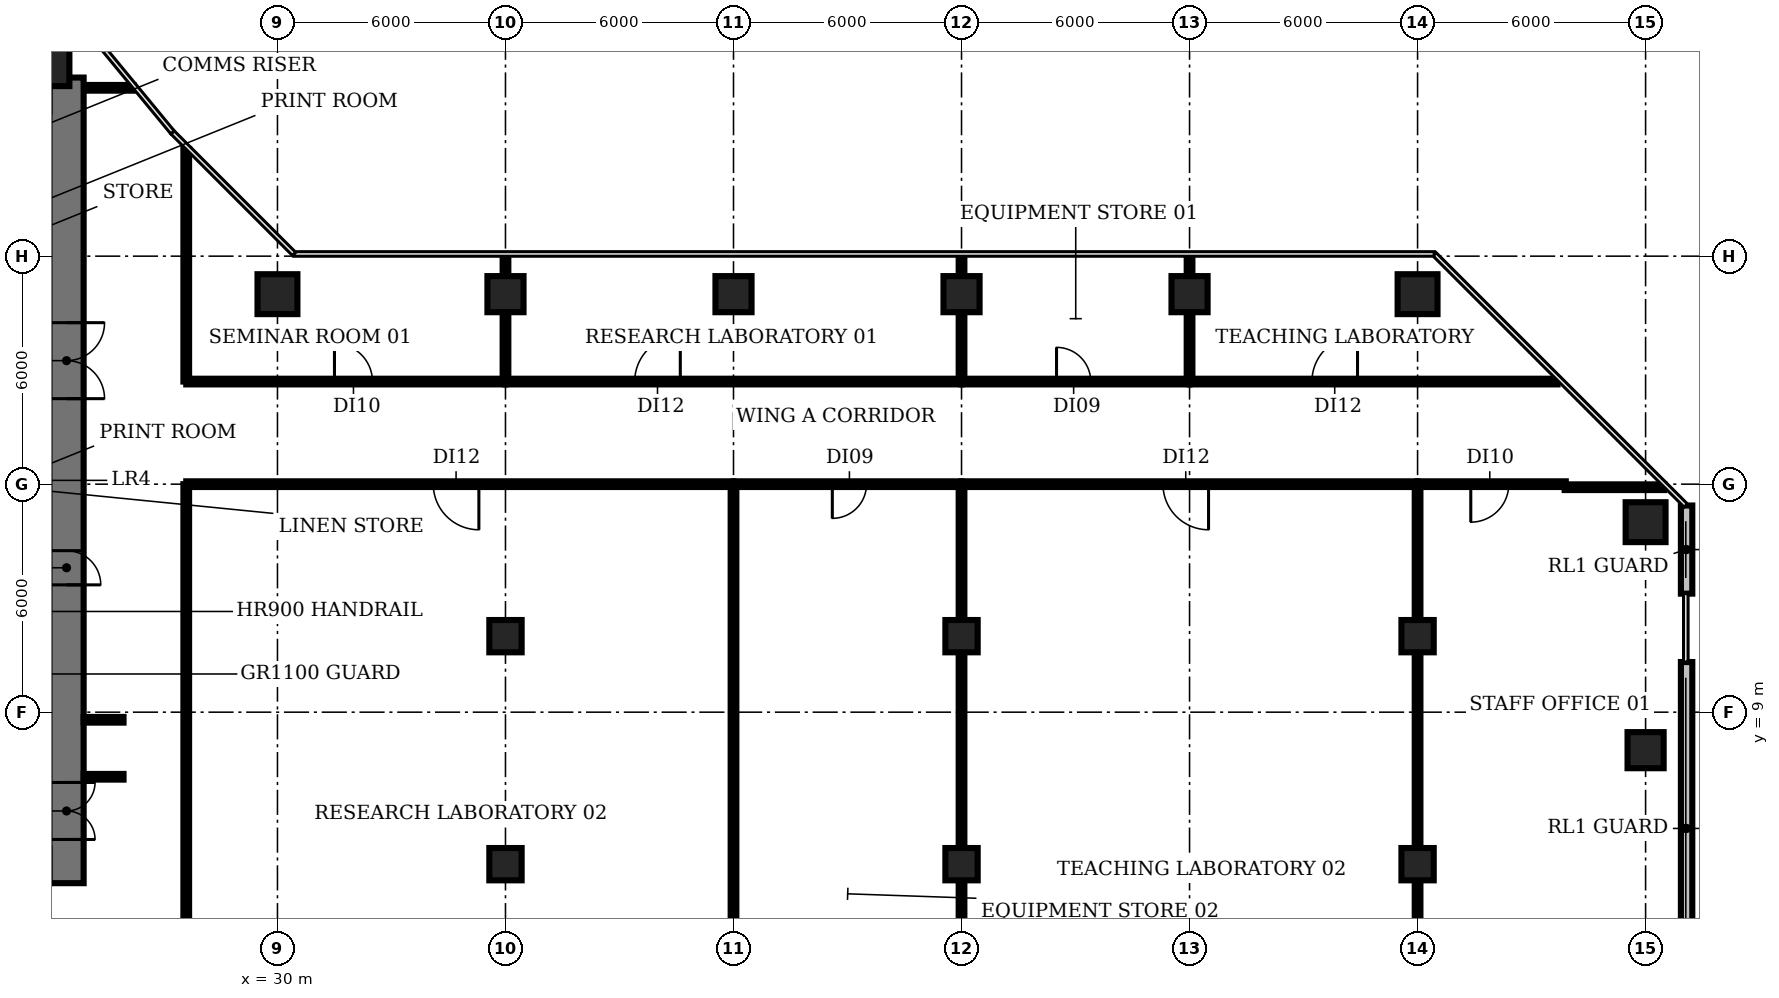
"""IFC4 building model, lengths in metres.
Left out: names, types, materials, properties, quantities, classifications, styles, units other than length and angle.
Written with IfcOpenShell. Run it as: python <this file> out.ifc"""

import sys

from ifc_helpers import new_model, si_unit, direction, frame, frame_2d, origin, origin_2d, place, context, subcontext, project, spatial, rectangle, circle, extrude, element, fill, save


model = new_model("IFC4")
c1 = context("Model", 3, precision=1e-05, world=origin(), true_north=direction((0.0, 1.0)))
c2 = subcontext(c1, "Body", "Model", "MODEL_VIEW")
j1 = project(units=[si_unit("LENGTHUNIT", "METRE"), si_unit("PLANEANGLEUNIT", "RADIAN")], contexts=[c1])
p1 = place(None, origin())
s1 = spatial("IfcSite", under=j1, at=p1, CompositionType="ELEMENT")
p2 = place(p1, origin())
s2 = spatial("IfcBuilding", under=s1, at=p2, CompositionType="ELEMENT")
p3 = place(p2, frame((0.0, 0.0, 29.0)))
s3 = spatial("IfcBuildingStorey", under=s2, at=p3, CompositionType="ELEMENT", Elevation=29.0)
for number, where, z_axis, x_axis in (
    (1, (24.0, 26.0, 0.0), (0.0, 0.0, 1.0), (1.0, 0.0, 0.0)),
    (2, (30.0, 20.0, 0.0), (0.0, 0.0, 1.0), (1.0, 0.0, 0.0)),
):
    element("IfcColumn", number, at=place(p3, frame(where, z_axis=z_axis, x_axis=x_axis)), inside=s3, PredefinedType="COLUMN", context=c2, shape_type="SweptSolid", body=[
        extrude(circle(Radius=0.525, at=origin_2d()), origin(), (0.0, 0.0, 1.0), 3.85),
    ])
for number, where, z_axis, x_axis in (
    (3, (36.0, 5.0, 0.0), (0.0, 0.0, 1.0), (1.0, 0.0, 0.0)),
    (4, (36.0, 11.0, 0.0), (0.0, 0.0, 1.0), (1.0, 0.0, 0.0)),
):
    element("IfcColumn", number, at=place(p3, frame(where, z_axis=z_axis, x_axis=x_axis)), inside=s3, PredefinedType="COLUMN", context=c2, shape_type="SweptSolid", body=[
        extrude(rectangle(XDim=0.85, YDim=0.85, at=origin_2d()), origin(), (0.0, 0.0, 1.0), 3.85),
    ])
for number, where, z_axis, x_axis in (
    (5, (36.0, 20.0, 0.0), (0.0, 0.0, 1.0), (1.0, 0.0, 0.0)),
    (6, (42.0, 20.0, 0.0), (0.0, 0.0, 1.0), (1.0, 0.0, 0.0)),
):
    element("IfcColumn", number, at=place(p3, frame(where, z_axis=z_axis, x_axis=x_axis)), inside=s3, PredefinedType="COLUMN", context=c2, shape_type="SweptSolid", body=[
        extrude(rectangle(XDim=0.95, YDim=0.95, at=origin_2d()), origin(), (0.0, 0.0, 1.0), 3.85),
    ])
for number, where, z_axis, x_axis in (
    (7, (48.0, 5.0, 0.0), (0.0, 0.0, 1.0), (1.0, 0.0, 0.0)),
    (8, (48.0, 11.0, 0.0), (0.0, 0.0, 1.0), (1.0, 0.0, 0.0)),
):
    element("IfcColumn", number, at=place(p3, frame(where, z_axis=z_axis, x_axis=x_axis)), inside=s3, PredefinedType="COLUMN", context=c2, shape_type="SweptSolid", body=[
        extrude(rectangle(XDim=0.85, YDim=0.85, at=origin_2d()), origin(), (0.0, 0.0, 1.0), 3.85),
    ])
for number, where, z_axis, x_axis in (
    (9, (48.0, 20.0, 0.0), (0.0, 0.0, 1.0), (1.0, 0.0, 0.0)),
    (10, (54.0, 20.0, 0.0), (0.0, 0.0, 1.0), (1.0, 0.0, 0.0)),
):
    element("IfcColumn", number, at=place(p3, frame(where, z_axis=z_axis, x_axis=x_axis)), inside=s3, PredefinedType="COLUMN", context=c2, shape_type="SweptSolid", body=[
        extrude(rectangle(XDim=0.95, YDim=0.95, at=origin_2d()), origin(), (0.0, 0.0, 1.0), 3.85),
    ])
for number, where, z_axis, x_axis in (
    (11, (60.0, 5.0, 0.0), (0.0, 0.0, 1.0), (1.0, 0.0, 0.0)),
    (12, (60.0, 11.0, 0.0), (0.0, 0.0, 1.0), (1.0, 0.0, 0.0)),
):
    element("IfcColumn", number, at=place(p3, frame(where, z_axis=z_axis, x_axis=x_axis)), inside=s3, PredefinedType="COLUMN", context=c2, shape_type="SweptSolid", body=[
        extrude(rectangle(XDim=0.85, YDim=0.85, at=origin_2d()), origin(), (0.0, 0.0, 1.0), 3.85),
    ])
p4 = place(p3, frame((60.0, 20.0, 0.0), z_axis=(0.0, 0.0, 1.0), x_axis=(1.0, 0.0, 0.0)))
e13 = element("IfcColumn", 13, at=p4, inside=s3, PredefinedType="COLUMN", context=c2, shape_type="SweptSolid", body=[
    extrude(circle(Radius=0.525, at=origin_2d()), origin(), (0.0, 0.0, 1.0), 3.85),
])
p5 = place(p3, frame((66.0, 8.0, 0.0), z_axis=(0.0, 0.0, 1.0), x_axis=(1.0, 0.0, 0.0)))
e14 = element("IfcColumn", 14, at=p5, inside=s3, PredefinedType="COLUMN", context=c2, shape_type="SweptSolid", body=[
    extrude(rectangle(XDim=0.95, YDim=0.95, at=origin_2d()), origin(), (0.0, 0.0, 1.0), 3.85),
])
p6 = place(p3, frame((66.0, 14.0, 0.0), z_axis=(0.0, 0.0, 1.0), x_axis=(1.0, 0.0, 0.0)))
e15 = element("IfcColumn", 15, at=p6, inside=s3, PredefinedType="COLUMN", context=c2, shape_type="SweptSolid", body=[
    extrude(circle(Radius=0.525, at=origin_2d()), origin(), (0.0, 0.0, 1.0), 3.85),
])
p7 = place(p3, frame((67.079, 1.562, 0.0), z_axis=(0.0, 0.0, 1.0), x_axis=(0.0, 1.0, 0.0)))
e16 = element("IfcWall", 16, at=p7, inside=s3, PredefinedType="SOLIDWALL", context=c2, shape_type="SweptSolid", body=[
    extrude(rectangle(XDim=8.757, YDim=0.3, at=frame_2d((4.379, 0.0))), origin(), (0.0, 0.0, 1.0), 3.85),
])
p8 = place(p3, frame((67.079, 12.119, 0.0), z_axis=(0.0, 0.0, 1.0), x_axis=(0.0, 1.0, 0.0)))
e17 = element("IfcWall", 17, at=p8, inside=s3, PredefinedType="SOLIDWALL", context=c2, shape_type="SweptSolid", body=[
    extrude(rectangle(XDim=2.319, YDim=0.3, at=frame_2d((1.16, 0.0))), origin(), (0.0, 0.0, 1.0), 3.85),
])
p9 = place(p3, frame((24.45, 25.7, 0.0), z_axis=(0.0, 0.0, 1.0), x_axis=(0.0, -1.0, 0.0)))
e18 = element("IfcWall", 18, at=p9, inside=s3, PredefinedType="SHEAR", context=c2, shape_type="SweptSolid", body=[
    extrude(rectangle(XDim=21.2, YDim=0.9, at=frame_2d((10.6, 0.0))), origin(), (0.0, 0.0, 1.0), 3.85),
])
p10 = place(p9, frame((18.55, 0.0, 0.0)))
e19 = element("IfcOpeningElement", 19, at=p10, cuts=e18, PredefinedType="OPENING", context=c2, shape_type="SweptSolid", body=[
    extrude(rectangle(XDim=1.5, YDim=2.1, at=frame_2d((0.75, 1.05))), frame((0.0, 0.46, 0.0), z_axis=(0.0, -1.0, 0.0), x_axis=(1.0, 0.0, 0.0)), (0.0, 0.0, 1.0), 0.92),
])
p11 = place(p9, frame((12.45, 0.0, 0.0)))
e20 = element("IfcOpeningElement", 20, at=p11, cuts=e18, PredefinedType="OPENING", context=c2, shape_type="SweptSolid", body=[
    extrude(rectangle(XDim=0.9, YDim=2.1, at=frame_2d((0.45, 1.05))), frame((0.0, 0.46, 0.0), z_axis=(0.0, -1.0, 0.0), x_axis=(1.0, 0.0, 0.0)), (0.0, 0.0, 1.0), 0.92),
])
p12 = place(p9, frame((6.45, 0.0, 0.0)))
e21 = element("IfcOpeningElement", 21, at=p12, cuts=e18, PredefinedType="OPENING", context=c2, shape_type="SweptSolid", body=[
    extrude(rectangle(XDim=2.0, YDim=2.1, at=frame_2d((1.0, 1.05))), frame((0.0, 0.46, 0.0), z_axis=(0.0, -1.0, 0.0), x_axis=(1.0, 0.0, 0.0)), (0.0, 0.0, 1.0), 0.92),
])
for number, where, z_axis, x_axis in (
    (22, (24.9, 7.3, 0.0), (0.0, 0.0, 1.0), (1.0, 0.0, 0.0)),
    (23, (24.9, 8.8, 0.0), (0.0, 0.0, 1.0), (1.0, 0.0, 0.0)),
):
    element("IfcWall", number, at=place(p3, frame(where, z_axis=z_axis, x_axis=x_axis)), inside=s3, PredefinedType="PARTITIONING", context=c2, shape_type="SweptSolid", body=[
        extrude(rectangle(XDim=1.05, YDim=0.15, at=frame_2d((0.525, 0.0))), origin(), (0.0, 0.0, 1.0), 2.83),
    ])
p13 = place(p3, frame((25.0, 25.43, 0.0), z_axis=(0.0, 0.0, 1.0), x_axis=(1.0, 0.0, 0.0)))
e24 = element("IfcWall", 24, at=p13, inside=s3, PredefinedType="PARTITIONING", context=c2, shape_type="SweptSolid", body=[
    extrude(rectangle(XDim=1.21, YDim=0.15, at=frame_2d((0.605, 0.0))), origin(), (0.0, 0.0, 1.0), 2.83),
])
p14 = place(p3, frame((27.6, 0.6, 0.0), z_axis=(0.0, 0.0, 1.0), x_axis=(0.0, 1.0, 0.0)))
e25 = element("IfcWall", 25, at=p14, inside=s3, PredefinedType="PARTITIONING", context=c2, shape_type="SweptSolid", body=[
    extrude(rectangle(XDim=14.4, YDim=0.15, at=frame_2d((7.2, 0.0))), origin(), (0.0, 0.0, 1.0), 2.83),
])
p15 = place(p3, frame((27.6, 17.7, 0.0), z_axis=(0.0, 0.0, 1.0), x_axis=(0.0, 1.0, 0.0)))
e26 = element("IfcWall", 26, at=p15, inside=s3, PredefinedType="PARTITIONING", context=c2, shape_type="SweptSolid", body=[
    extrude(rectangle(XDim=6.12, YDim=0.15, at=frame_2d((3.06, 0.0))), origin(), (0.0, 0.0, 1.0), 2.83),
])
p16 = place(p3, frame((27.6, 17.7, 0.0), z_axis=(0.0, 0.0, 1.0), x_axis=(1.0, 0.0, 0.0)))
e27 = element("IfcWall", 27, at=p16, inside=s3, PredefinedType="PARTITIONING", context=c2, shape_type="SweptSolid", body=[
    extrude(rectangle(XDim=8.4, YDim=0.15, at=frame_2d((4.2, 0.0))), origin(), (0.0, 0.0, 1.0), 2.83),
])
p17 = place(p16, frame((3.9, 0.0, 0.0)))
e28 = element("IfcOpeningElement", 28, at=p17, cuts=e27, PredefinedType="OPENING", context=c2, shape_type="SweptSolid", body=[
    extrude(rectangle(XDim=1.0, YDim=2.1, at=frame_2d((0.5, 1.05))), frame((0.0, 0.085, 0.0), z_axis=(0.0, -1.0, 0.0), x_axis=(1.0, 0.0, 0.0)), (0.0, 0.0, 1.0), 0.17),
])
p18 = place(p3, frame((36.0, 17.7, 0.0), z_axis=(0.0, 0.0, 1.0), x_axis=(0.0, 1.0, 0.0)))
e29 = element("IfcWall", 29, at=p18, inside=s3, PredefinedType="PARTITIONING", context=c2, shape_type="SweptSolid", body=[
    extrude(rectangle(XDim=3.31, YDim=0.15, at=frame_2d((1.655, 0.0))), origin(), (0.0, 0.0, 1.0), 2.83),
])
p19 = place(p3, frame((36.0, 17.7, 0.0), z_axis=(0.0, 0.0, 1.0), x_axis=(1.0, 0.0, 0.0)))
e30 = element("IfcWall", 30, at=p19, inside=s3, PredefinedType="PARTITIONING", context=c2, shape_type="SweptSolid", body=[
    extrude(rectangle(XDim=12.0, YDim=0.15, at=frame_2d((6.0, 0.0))), origin(), (0.0, 0.0, 1.0), 2.83),
])
p20 = place(p19, frame((3.4, 0.0, 0.0)))
e31 = element("IfcOpeningElement", 31, at=p20, cuts=e30, PredefinedType="OPENING", context=c2, shape_type="SweptSolid", body=[
    extrude(rectangle(XDim=1.2, YDim=2.1, at=frame_2d((0.6, 1.05))), frame((0.0, 0.085, 0.0), z_axis=(0.0, -1.0, 0.0), x_axis=(1.0, 0.0, 0.0)), (0.0, 0.0, 1.0), 0.17),
])
p21 = place(p3, frame((42.0, -6.56, 0.0), z_axis=(0.0, 0.0, 1.0), x_axis=(0.0, 1.0, 0.0)))
e32 = element("IfcWall", 32, at=p21, inside=s3, PredefinedType="PARTITIONING", context=c2, shape_type="SweptSolid", body=[
    extrude(rectangle(XDim=21.56, YDim=0.15, at=frame_2d((10.78, 0.0))), origin(), (0.0, 0.0, 1.0), 2.83),
])
p22 = place(p3, frame((42.0, 15.0, 0.0), z_axis=(0.0, 0.0, 1.0), x_axis=(-1.0, 0.0, 0.0)))
e33 = element("IfcWall", 33, at=p22, inside=s3, PredefinedType="PARTITIONING", context=c2, shape_type="SweptSolid", body=[
    extrude(rectangle(XDim=14.4, YDim=0.15, at=frame_2d((7.2, 0.0))), origin(), (0.0, 0.0, 1.0), 2.83),
])
p23 = place(p22, frame((6.7, 0.0, 0.0)))
e34 = element("IfcOpeningElement", 34, at=p23, cuts=e33, PredefinedType="OPENING", context=c2, shape_type="SweptSolid", body=[
    extrude(rectangle(XDim=1.2, YDim=2.1, at=frame_2d((0.6, 1.05))), frame((0.0, 0.085, 0.0), z_axis=(0.0, -1.0, 0.0), x_axis=(1.0, 0.0, 0.0)), (0.0, 0.0, 1.0), 0.17),
])
p24 = place(p3, frame((48.0, -7.14, 0.0), z_axis=(0.0, 0.0, 1.0), x_axis=(0.0, 1.0, 0.0)))
e35 = element("IfcWall", 35, at=p24, inside=s3, PredefinedType="PARTITIONING", context=c2, shape_type="SweptSolid", body=[
    extrude(rectangle(XDim=22.14, YDim=0.15, at=frame_2d((11.07, 0.0))), origin(), (0.0, 0.0, 1.0), 2.83),
])
p25 = place(p3, frame((48.0, 15.0, 0.0), z_axis=(0.0, 0.0, 1.0), x_axis=(-1.0, 0.0, 0.0)))
e36 = element("IfcWall", 36, at=p25, inside=s3, PredefinedType="PARTITIONING", context=c2, shape_type="SweptSolid", body=[
    extrude(rectangle(XDim=6.0, YDim=0.15, at=frame_2d((3.0, 0.0))), origin(), (0.0, 0.0, 1.0), 2.83),
])
p26 = place(p25, frame((2.5, 0.0, 0.0)))
e37 = element("IfcOpeningElement", 37, at=p26, cuts=e36, PredefinedType="OPENING", context=c2, shape_type="SweptSolid", body=[
    extrude(rectangle(XDim=0.9, YDim=2.1, at=frame_2d((0.45, 1.05))), frame((0.0, 0.085, 0.0), z_axis=(0.0, -1.0, 0.0), x_axis=(1.0, 0.0, 0.0)), (0.0, 0.0, 1.0), 0.17),
])
p27 = place(p3, frame((48.0, 17.7, 0.0), z_axis=(0.0, 0.0, 1.0), x_axis=(0.0, 1.0, 0.0)))
e38 = element("IfcWall", 38, at=p27, inside=s3, PredefinedType="PARTITIONING", context=c2, shape_type="SweptSolid", body=[
    extrude(rectangle(XDim=3.31, YDim=0.15, at=frame_2d((1.655, 0.0))), origin(), (0.0, 0.0, 1.0), 2.83),
])
p28 = place(p3, frame((48.0, 17.7, 0.0), z_axis=(0.0, 0.0, 1.0), x_axis=(1.0, 0.0, 0.0)))
e39 = element("IfcWall", 39, at=p28, inside=s3, PredefinedType="PARTITIONING", context=c2, shape_type="SweptSolid", body=[
    extrude(rectangle(XDim=6.0, YDim=0.15, at=frame_2d((3.0, 0.0))), origin(), (0.0, 0.0, 1.0), 2.83),
])
p29 = place(p28, frame((2.5, 0.0, 0.0)))
e40 = element("IfcOpeningElement", 40, at=p29, cuts=e39, PredefinedType="OPENING", context=c2, shape_type="SweptSolid", body=[
    extrude(rectangle(XDim=0.9, YDim=2.1, at=frame_2d((0.45, 1.05))), frame((0.0, 0.085, 0.0), z_axis=(0.0, -1.0, 0.0), x_axis=(1.0, 0.0, 0.0)), (0.0, 0.0, 1.0), 0.17),
])
p30 = place(p3, frame((54.0, 17.7, 0.0), z_axis=(0.0, 0.0, 1.0), x_axis=(0.0, 1.0, 0.0)))
e41 = element("IfcWall", 41, at=p30, inside=s3, PredefinedType="PARTITIONING", context=c2, shape_type="SweptSolid", body=[
    extrude(rectangle(XDim=3.31, YDim=0.15, at=frame_2d((1.655, 0.0))), origin(), (0.0, 0.0, 1.0), 2.83),
])
p31 = place(p3, frame((54.0, 17.7, 0.0), z_axis=(0.0, 0.0, 1.0), x_axis=(1.0, 0.0, 0.0)))
e42 = element("IfcWall", 42, at=p31, inside=s3, PredefinedType="PARTITIONING", context=c2, shape_type="SweptSolid", body=[
    extrude(rectangle(XDim=9.683, YDim=0.15, at=frame_2d((4.842, 0.0))), origin(), (0.0, 0.0, 1.0), 2.83),
])
p32 = place(p31, frame((3.22, 0.0, 0.0)))
e43 = element("IfcOpeningElement", 43, at=p32, cuts=e42, PredefinedType="OPENING", context=c2, shape_type="SweptSolid", body=[
    extrude(rectangle(XDim=1.2, YDim=2.1, at=frame_2d((0.6, 1.05))), frame((0.0, 0.085, 0.0), z_axis=(0.0, -1.0, 0.0), x_axis=(1.0, 0.0, 0.0)), (0.0, 0.0, 1.0), 0.17),
])
p33 = place(p3, frame((60.0, -5.48, 0.0), z_axis=(0.0, 0.0, 1.0), x_axis=(0.0, 1.0, 0.0)))
e44 = element("IfcWall", 44, at=p33, inside=s3, PredefinedType="PARTITIONING", context=c2, shape_type="SweptSolid", body=[
    extrude(rectangle(XDim=20.48, YDim=0.15, at=frame_2d((10.24, 0.0))), origin(), (0.0, 0.0, 1.0), 2.83),
])
p34 = place(p3, frame((60.0, 15.0, 0.0), z_axis=(0.0, 0.0, 1.0), x_axis=(-1.0, 0.0, 0.0)))
e45 = element("IfcWall", 45, at=p34, inside=s3, PredefinedType="PARTITIONING", context=c2, shape_type="SweptSolid", body=[
    extrude(rectangle(XDim=12.0, YDim=0.15, at=frame_2d((6.0, 0.0))), origin(), (0.0, 0.0, 1.0), 2.83),
])
p35 = place(p34, frame((5.5, 0.0, 0.0)))
e46 = element("IfcOpeningElement", 46, at=p35, cuts=e45, PredefinedType="OPENING", context=c2, shape_type="SweptSolid", body=[
    extrude(rectangle(XDim=1.2, YDim=2.1, at=frame_2d((0.6, 1.05))), frame((0.0, 0.085, 0.0), z_axis=(0.0, -1.0, 0.0), x_axis=(1.0, 0.0, 0.0)), (0.0, 0.0, 1.0), 0.17),
])
p36 = place(p3, frame((63.87, 14.92, 0.0), z_axis=(0.0, 0.0, 1.0), x_axis=(1.0, 0.0, 0.0)))
e47 = element("IfcWall", 47, at=p36, inside=s3, PredefinedType="PARTITIONING", context=c2, shape_type="SweptSolid", body=[
    extrude(rectangle(XDim=2.621, YDim=0.15, at=frame_2d((1.311, 0.0))), origin(), (0.0, 0.0, 1.0), 2.83),
])
p37 = place(p3, frame((63.9, 15.0, 0.0), z_axis=(0.0, 0.0, 1.0), x_axis=(-1.0, 0.0, 0.0)))
e48 = element("IfcWall", 48, at=p37, inside=s3, PredefinedType="PARTITIONING", context=c2, shape_type="SweptSolid", body=[
    extrude(rectangle(XDim=3.9, YDim=0.15, at=frame_2d((1.95, 0.0))), origin(), (0.0, 0.0, 1.0), 2.83),
])
p38 = place(p37, frame((1.5, 0.0, 0.0)))
e49 = element("IfcOpeningElement", 49, at=p38, cuts=e48, PredefinedType="OPENING", context=c2, shape_type="SweptSolid", body=[
    extrude(rectangle(XDim=1.0, YDim=2.1, at=frame_2d((0.5, 1.05))), frame((0.0, 0.085, 0.0), z_axis=(0.0, -1.0, 0.0), x_axis=(1.0, 0.0, 0.0)), (0.0, 0.0, 1.0), 0.17),
])
p39 = place(p10, origin())
e50 = element("IfcDoor", 50, at=p39, inside=s3, OperationType="DOUBLE_DOOR_SINGLE_SWING", PredefinedType="DOOR", context=c2, shape_type="SweptSolid", body=[
    extrude(rectangle(XDim=1.5, YDim=2.1, at=frame_2d((0.75, 1.05))), frame((0.0, 0.025, 0.0), z_axis=(0.0, -1.0, 0.0), x_axis=(1.0, 0.0, 0.0)), (0.0, 0.0, 1.0), 0.05),
])
fill(e19, e50)
p40 = place(p12, origin())
e51 = element("IfcDoor", 51, at=p40, inside=s3, OperationType="DOUBLE_DOOR_SINGLE_SWING", PredefinedType="DOOR", context=c2, shape_type="SweptSolid", body=[
    extrude(rectangle(XDim=2.0, YDim=2.1, at=frame_2d((1.0, 1.05))), frame((0.0, 0.025, 0.0), z_axis=(0.0, -1.0, 0.0), x_axis=(1.0, 0.0, 0.0)), (0.0, 0.0, 1.0), 0.05),
])
fill(e21, e51)
p41 = place(p17, origin())
e52 = element("IfcDoor", 52, at=p41, inside=s3, OperationType="SINGLE_SWING_LEFT", PredefinedType="DOOR", context=c2, shape_type="SweptSolid", body=[
    extrude(rectangle(XDim=1.0, YDim=2.1, at=frame_2d((0.5, 1.05))), frame((0.0, 0.025, 0.0), z_axis=(0.0, -1.0, 0.0), x_axis=(1.0, 0.0, 0.0)), (0.0, 0.0, 1.0), 0.05),
])
fill(e28, e52)
p42 = place(p20, origin())
e53 = element("IfcDoor", 53, at=p42, inside=s3, OperationType="SINGLE_SWING_RIGHT", PredefinedType="DOOR", context=c2, shape_type="SweptSolid", body=[
    extrude(rectangle(XDim=1.2, YDim=2.1, at=frame_2d((0.6, 1.05))), frame((0.0, 0.025, 0.0), z_axis=(0.0, -1.0, 0.0), x_axis=(1.0, 0.0, 0.0)), (0.0, 0.0, 1.0), 0.05),
])
fill(e31, e53)
p43 = place(p23, origin())
e54 = element("IfcDoor", 54, at=p43, inside=s3, OperationType="SINGLE_SWING_LEFT", PredefinedType="DOOR", context=c2, shape_type="SweptSolid", body=[
    extrude(rectangle(XDim=1.2, YDim=2.1, at=frame_2d((0.6, 1.05))), frame((0.0, 0.025, 0.0), z_axis=(0.0, -1.0, 0.0), x_axis=(1.0, 0.0, 0.0)), (0.0, 0.0, 1.0), 0.05),
])
fill(e34, e54)
p44 = place(p26, origin())
e55 = element("IfcDoor", 55, at=p44, inside=s3, OperationType="SINGLE_SWING_RIGHT", PredefinedType="DOOR", context=c2, shape_type="SweptSolid", body=[
    extrude(rectangle(XDim=0.9, YDim=2.1, at=frame_2d((0.45, 1.05))), frame((0.0, 0.025, 0.0), z_axis=(0.0, -1.0, 0.0), x_axis=(1.0, 0.0, 0.0)), (0.0, 0.0, 1.0), 0.05),
])
fill(e37, e55)
p45 = place(p29, origin())
e56 = element("IfcDoor", 56, at=p45, inside=s3, OperationType="SINGLE_SWING_LEFT", PredefinedType="DOOR", context=c2, shape_type="SweptSolid", body=[
    extrude(rectangle(XDim=0.9, YDim=2.1, at=frame_2d((0.45, 1.05))), frame((0.0, 0.025, 0.0), z_axis=(0.0, -1.0, 0.0), x_axis=(1.0, 0.0, 0.0)), (0.0, 0.0, 1.0), 0.05),
])
fill(e40, e56)
p46 = place(p32, origin())
e57 = element("IfcDoor", 57, at=p46, inside=s3, OperationType="SINGLE_SWING_RIGHT", PredefinedType="DOOR", context=c2, shape_type="SweptSolid", body=[
    extrude(rectangle(XDim=1.2, YDim=2.1, at=frame_2d((0.6, 1.05))), frame((0.0, 0.025, 0.0), z_axis=(0.0, -1.0, 0.0), x_axis=(1.0, 0.0, 0.0)), (0.0, 0.0, 1.0), 0.05),
])
fill(e43, e57)
p47 = place(p35, origin())
e58 = element("IfcDoor", 58, at=p47, inside=s3, OperationType="SINGLE_SWING_LEFT", PredefinedType="DOOR", context=c2, shape_type="SweptSolid", body=[
    extrude(rectangle(XDim=1.2, YDim=2.1, at=frame_2d((0.6, 1.05))), frame((0.0, 0.025, 0.0), z_axis=(0.0, -1.0, 0.0), x_axis=(1.0, 0.0, 0.0)), (0.0, 0.0, 1.0), 0.05),
])
fill(e46, e58)
p48 = place(p38, origin())
e59 = element("IfcDoor", 59, at=p48, inside=s3, OperationType="SINGLE_SWING_RIGHT", PredefinedType="DOOR", context=c2, shape_type="SweptSolid", body=[
    extrude(rectangle(XDim=1.0, YDim=2.1, at=frame_2d((0.5, 1.05))), frame((0.0, 0.025, 0.0), z_axis=(0.0, -1.0, 0.0), x_axis=(1.0, 0.0, 0.0)), (0.0, 0.0, 1.0), 0.05),
])
fill(e49, e59)
save(model, sys.argv[1])
